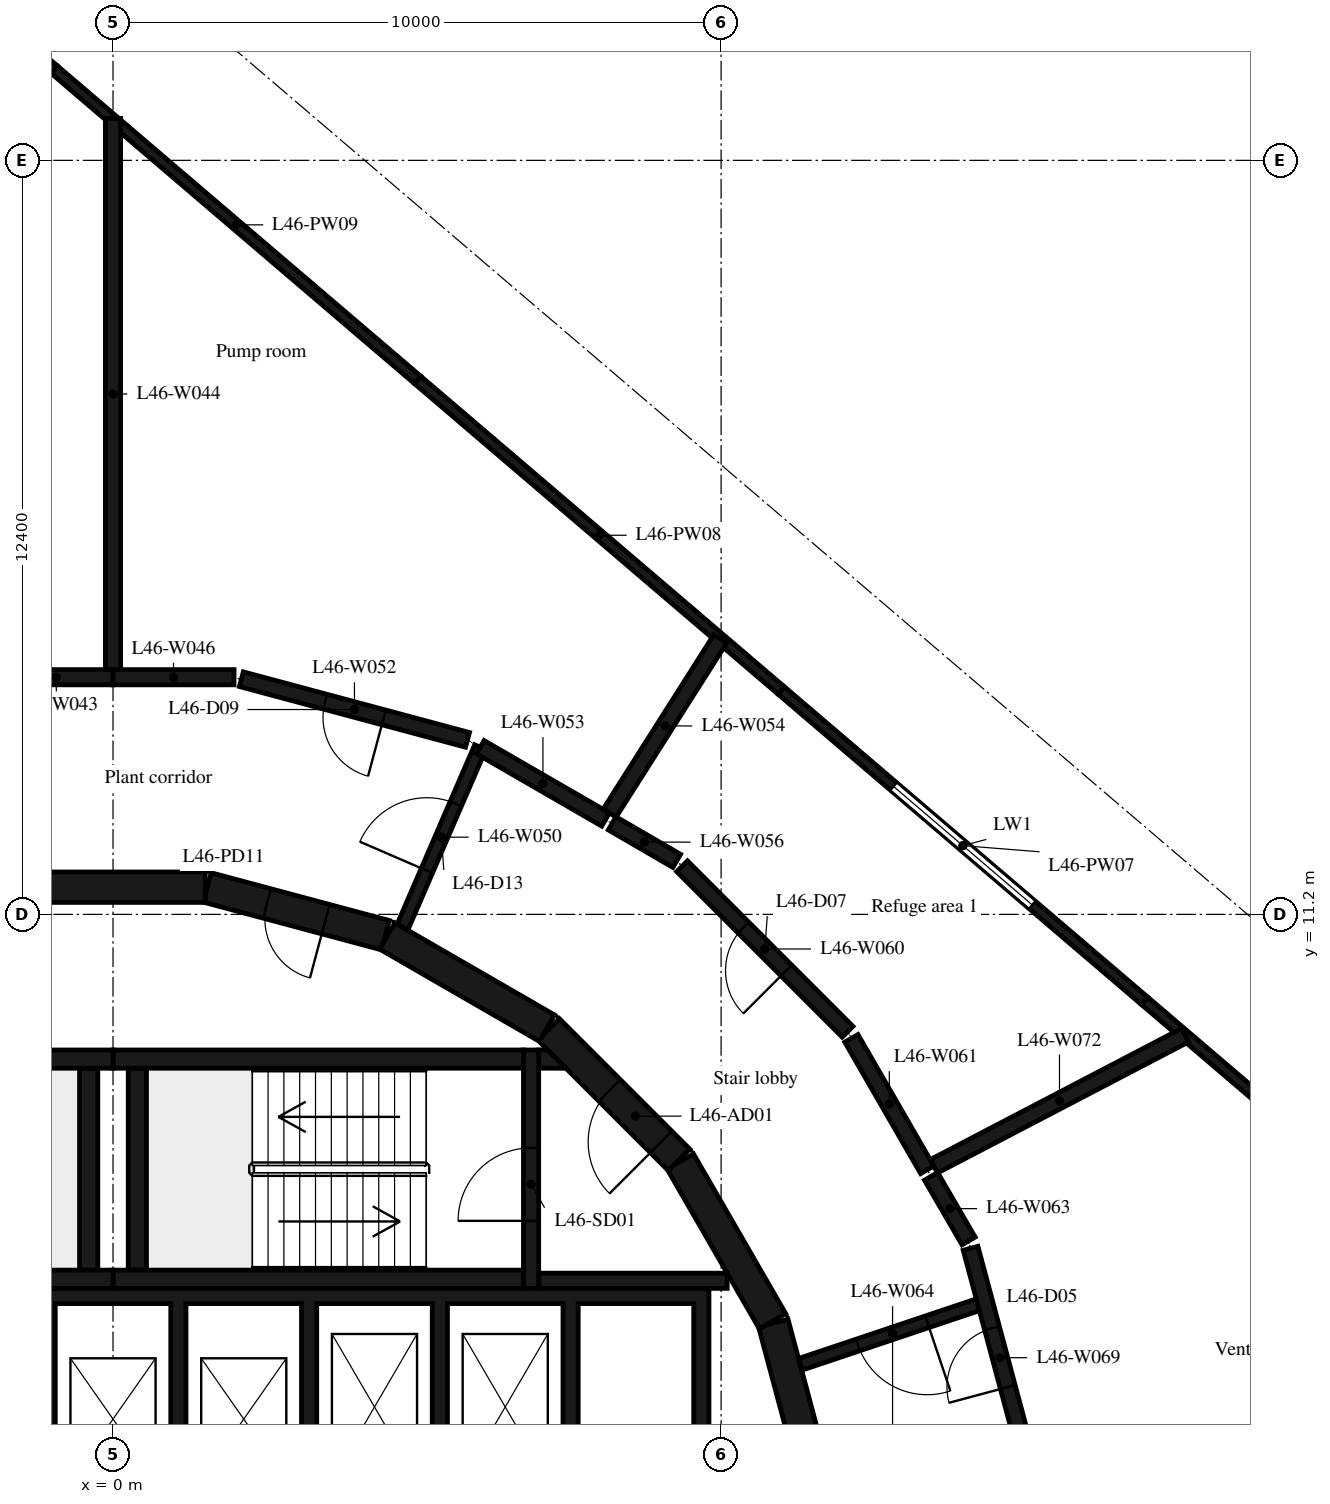
"""IFC4 building model, lengths in metres.
Left out: names, types, materials, properties, quantities, classifications, styles, units other than length and angle.
Written with IfcOpenShell. Run it as: python <this file> out.ifc"""

import sys

from ifc_helpers import new_model, si_unit, direction, frame, frame_2d, origin, place, context, subcontext, project, spatial, polyline, rectangle, outline, extrude, element, fill, save


model = new_model("IFC4")
c1 = context("Model", 3, precision=1e-05, world=origin(), true_north=direction((0.0, 1.0)))
c2 = subcontext(c1, "Body", "Model", "MODEL_VIEW")
j1 = project(units=[si_unit("LENGTHUNIT", "METRE"), si_unit("PLANEANGLEUNIT", "RADIAN")], contexts=[c1])
p1 = place(None, origin())
s1 = spatial("IfcSite", under=j1, at=p1, CompositionType="ELEMENT")
p2 = place(p1, origin())
s2 = spatial("IfcBuilding", under=s1, at=p2, CompositionType="ELEMENT")
p3 = place(p2, frame((0.0, 0.0, 183.2)))
s3 = spatial("IfcBuildingStorey", under=s2, at=p3, CompositionType="ELEMENT", Elevation=183.2)
p4 = place(p3, frame((22.942, 4.673, 0.0), z_axis=(0.0, 0.0, 1.0), x_axis=(-0.76041522011, 0.649437212535, 0.0)))
e1 = element("IfcWall", 1, at=p4, inside=s3, PredefinedType="STANDARD", context=c2, shape_type="SweptSolid", body=[
    extrude(rectangle(XDim=7.86, YDim=0.16, at=frame_2d((3.93, 0.0))), origin(), (0.0, 0.0, 1.0), 4.75),
])
p5 = place(p4, frame((2.167, 0.0, 1.0)))
e2 = element("IfcOpeningElement", 2, at=p5, cuts=e1, PredefinedType="OPENING", context=c2, shape_type="SweptSolid", body=[
    extrude(rectangle(XDim=3.0, YDim=2.2, at=frame_2d((1.5, 1.1))), frame((0.0, 0.09, 0.0), z_axis=(0.0, -1.0, 0.0), x_axis=(1.0, 0.0, 0.0)), (0.0, 0.0, 1.0), 0.18),
])
p6 = place(p3, frame((16.965, 9.778, 0.0), z_axis=(0.0, 0.0, 1.0), x_axis=(-0.760402119436, 0.649452551582, 0.0)))
e3 = element("IfcWall", 3, at=p6, inside=s3, PredefinedType="STANDARD", context=c2, shape_type="SweptSolid", body=[
    extrude(rectangle(XDim=7.86, YDim=0.16, at=frame_2d((3.93, 0.0))), origin(), (0.0, 0.0, 1.0), 4.75),
])
p7 = place(p6, frame((2.43, 0.0, 1.0)))
e4 = element("IfcOpeningElement", 4, at=p7, cuts=e3, PredefinedType="OPENING", context=c2, shape_type="SweptSolid", body=[
    extrude(rectangle(XDim=3.0, YDim=2.2, at=frame_2d((1.5, 1.1))), frame((0.0, 0.09, 0.0), z_axis=(0.0, -1.0, 0.0), x_axis=(1.0, 0.0, 0.0)), (0.0, 0.0, 1.0), 0.18),
])
for number, where, z_axis, x_axis in (
    (5, (10.988, 14.883, 0.0), (0.0, 0.0, 1.0), (-0.76, 0.649, 0.0)),
    (6, (5.011, 19.987, 0.0), (0.0, 0.0, 1.0), (-0.76, 0.649, 0.0)),
):
    element("IfcWall", number, at=place(p3, frame(where, z_axis=z_axis, x_axis=x_axis)), inside=s3, PredefinedType="STANDARD", context=c2, shape_type="SweptSolid", body=[
        extrude(rectangle(XDim=7.86, YDim=0.16, at=frame_2d((3.93, 0.0))), origin(), (0.0, 0.0, 1.0), 4.75),
    ])
p8 = place(p3, frame((-0.966, 25.092, 0.0), z_axis=(0.0, 0.0, 1.0), x_axis=(-0.760346823152, 0.649517288856, 0.0)))
e7 = element("IfcWall", 7, at=p8, inside=s3, PredefinedType="STANDARD", context=c2, shape_type="SweptSolid", body=[
    extrude(rectangle(XDim=1.216, YDim=0.16, at=frame_2d((0.608, 0.0))), origin(), (0.0, 0.0, 1.0), 4.75),
])
for number, where, z_axis, x_axis in (
    (8, (11.643, 1.55, 0.0), (0.0, 0.0, 1.0), (-0.259, 0.966, 0.0)),
    (9, (10.845, 4.51, 0.0), (0.0, 0.0, 1.0), (-0.5, 0.866, 0.0)),
):
    element("IfcWall", number, at=place(p3, frame(where, z_axis=z_axis, x_axis=x_axis)), inside=s3, PredefinedType="SHEAR", context=c2, shape_type="SweptSolid", body=[
        extrude(rectangle(XDim=3.033, YDim=0.5, at=frame_2d((1.516, 0.0))), origin(), (0.0, 0.0, 1.0), 4.75),
    ])
p9 = place(p3, frame((9.308, 7.164, 0.0), z_axis=(0.0, 0.0, 1.0), x_axis=(-0.707106781187, 0.707106781187, 0.0)))
e10 = element("IfcWall", 10, at=p9, inside=s3, PredefinedType="SHEAR", context=c2, shape_type="SweptSolid", body=[
    extrude(rectangle(XDim=3.032, YDim=0.5, at=frame_2d((1.516, 0.0))), origin(), (0.0, 0.0, 1.0), 4.75),
])
p10 = place(p9, frame((0.416, 0.0, 0.0)))
e11 = element("IfcOpeningElement", 11, at=p10, cuts=e10, PredefinedType="OPENING", context=c2, shape_type="SweptSolid", body=[
    extrude(rectangle(XDim=1.2, YDim=2.1, at=frame_2d((0.6, 1.05))), frame((0.0, 0.26, 0.0), z_axis=(0.0, -1.0, 0.0), x_axis=(1.0, 0.0, 0.0)), (0.0, 0.0, 1.0), 0.52),
])
p11 = place(p3, frame((7.137, 9.329, 0.0), z_axis=(0.0, 0.0, 1.0), x_axis=(-0.865975092491, 0.500087131594, 0.0)))
e12 = element("IfcWall", 12, at=p11, inside=s3, PredefinedType="SHEAR", context=c2, shape_type="SweptSolid", body=[
    extrude(rectangle(XDim=3.033, YDim=0.5, at=frame_2d((1.516, 0.0))), origin(), (0.0, 0.0, 1.0), 4.75),
])
p12 = place(p3, frame((4.479, 10.858, 0.0), z_axis=(0.0, 0.0, 1.0), x_axis=(-0.965948410781, 0.258734743916, 0.0)))
e13 = element("IfcWall", 13, at=p12, inside=s3, PredefinedType="SHEAR", context=c2, shape_type="SweptSolid", body=[
    extrude(rectangle(XDim=3.033, YDim=0.5, at=frame_2d((1.516, 0.0))), origin(), (0.0, 0.0, 1.0), 4.75),
])
p13 = place(p12, frame((1.016, 0.0, 0.0)))
e14 = element("IfcOpeningElement", 14, at=p13, cuts=e13, PredefinedType="OPENING", context=c2, shape_type="SweptSolid", body=[
    extrude(rectangle(XDim=1.0, YDim=2.4, at=frame_2d((0.5, 1.2))), frame((0.0, 0.26, 0.0), z_axis=(0.0, -1.0, 0.0), x_axis=(1.0, 0.0, 0.0)), (0.0, 0.0, 1.0), 0.52),
])
p14 = place(p3, frame((1.516, 11.647, 0.0), z_axis=(0.0, 0.0, 1.0), x_axis=(-1.0, 0.0, 0.0)))
e15 = element("IfcWall", 15, at=p14, inside=s3, PredefinedType="SHEAR", context=c2, shape_type="SweptSolid", body=[
    extrude(rectangle(XDim=3.033, YDim=0.5, at=frame_2d((1.516, 0.0))), origin(), (0.0, 0.0, 1.0), 4.75),
])
for number, where, z_axis, x_axis in (
    (16, (0.0, 5.2, 0.0), (0.0, 0.0, 1.0), (1.0, 0.0, 0.0)),
    (17, (0.0, 8.82, 0.0), (0.0, 0.0, 1.0), (1.0, 0.0, 0.0)),
):
    element("IfcWall", number, at=place(p3, frame(where, z_axis=z_axis, x_axis=x_axis)), inside=s3, PredefinedType="SHEAR", context=c2, shape_type="SweptSolid", body=[
        extrude(rectangle(XDim=6.75, YDim=0.3, at=frame_2d((3.375, 0.0))), origin(), (0.0, 0.0, 1.0), 4.75),
    ])
p15 = place(p3, frame((0.4, 5.35, 0.0), z_axis=(0.0, 0.0, 1.0), x_axis=(0.0, 1.0, 0.0)))
e18 = element("IfcWall", 18, at=p15, inside=s3, PredefinedType="SHEAR", context=c2, shape_type="SweptSolid", body=[
    extrude(rectangle(XDim=3.32, YDim=0.3, at=frame_2d((1.66, 0.0))), origin(), (0.0, 0.0, 1.0), 4.75),
])
p16 = place(p3, frame((6.875, 5.05, 0.0), z_axis=(0.0, 0.0, 1.0), x_axis=(0.0, 1.0, 0.0)))
e19 = element("IfcWall", 19, at=p16, inside=s3, PredefinedType="SHEAR", context=c2, shape_type="SweptSolid", body=[
    extrude(rectangle(XDim=3.92, YDim=0.25, at=frame_2d((1.96, 0.0))), origin(), (0.0, 0.0, 1.0), 4.75),
])
p17 = place(p16, frame((1.11, 0.0, 0.0)))
e20 = element("IfcOpeningElement", 20, at=p17, cuts=e19, PredefinedType="OPENING", context=c2, shape_type="SweptSolid", body=[
    extrude(rectangle(XDim=1.2, YDim=2.1, at=frame_2d((0.6, 1.05))), frame((0.0, 0.135, 0.0), z_axis=(0.0, -1.0, 0.0), x_axis=(1.0, 0.0, 0.0)), (0.0, 0.0, 1.0), 0.27),
])
p18 = place(p3, frame((7.0, 5.175, 0.0), z_axis=(0.0, 0.0, 1.0), x_axis=(1.0, 0.0, 0.0)))
e21 = element("IfcWall", 21, at=p18, inside=s3, PredefinedType="SHEAR", context=c2, shape_type="SweptSolid", body=[
    extrude(rectangle(XDim=3.1, YDim=0.25, at=frame_2d((1.55, 0.0))), origin(), (0.0, 0.0, 1.0), 4.75),
])
p19 = place(p3, origin())
e22 = element("IfcWall", 22, at=p19, inside=s3, PredefinedType="SHEAR", context=c2, shape_type="SweptSolid", body=[
    extrude(outline(polyline([(7.448, 8.67), (7.0, 8.67), (7.0, 8.97), (7.148, 8.97), (7.448, 8.67)])), origin(), (0.0, 0.0, 1.0), 4.75),
])
for number, where, z_axis, x_axis in (
    (23, (-6.75, 5.2, 0.0), (0.0, 0.0, 1.0), (1.0, 0.0, 0.0)),
    (24, (-6.75, 8.82, 0.0), (0.0, 0.0, 1.0), (1.0, 0.0, 0.0)),
):
    element("IfcWall", number, at=place(p3, frame(where, z_axis=z_axis, x_axis=x_axis)), inside=s3, PredefinedType="SHEAR", context=c2, shape_type="SweptSolid", body=[
        extrude(rectangle(XDim=6.75, YDim=0.3, at=frame_2d((3.375, 0.0))), origin(), (0.0, 0.0, 1.0), 4.75),
    ])
p20 = place(p3, frame((-0.4, 5.35, 0.0), z_axis=(0.0, 0.0, 1.0), x_axis=(0.0, 1.0, 0.0)))
e25 = element("IfcWall", 25, at=p20, inside=s3, PredefinedType="SHEAR", context=c2, shape_type="SweptSolid", body=[
    extrude(rectangle(XDim=3.32, YDim=0.3, at=frame_2d((1.66, 0.0))), origin(), (0.0, 0.0, 1.0), 4.75),
])
p21 = place(p3, origin())
e26 = element("IfcWall", 26, at=p21, inside=s3, PredefinedType="SHEAR", context=c2, shape_type="SweptSolid", body=[
    extrude(outline(polyline([(-9.55, 4.8), (-5.5, 4.8), (-5.5, 1.9), (-5.25, 1.9), (-5.25, 4.8), (-1.2, 4.8), (-1.2, 1.9), (-0.95, 1.9), (-0.95, 4.8), (0.95, 4.8), (0.95, 1.9), (1.2, 1.9), (1.2, 4.8), (3.1, 4.8), (3.1, 1.9), (3.35, 1.9), (3.35, 4.8), (5.25, 4.8), (5.25, 1.9), (5.5, 1.9), (5.5, 4.8), (7.4, 4.8), (7.4, 1.9), (7.65, 1.9), (7.65, 4.8), (9.55, 4.8), (9.55, 1.9), (9.8, 1.9), (9.8, 4.8), (9.8, 5.05), (-9.8, 5.05), (-9.8, 4.8), (-9.8, 1.9), (-9.55, 1.9), (-9.55, 4.8)])), origin(), (0.0, 0.0, 1.0), 4.75),
])
p22 = place(p3, frame((0.0, 15.1, 0.0), z_axis=(0.0, 0.0, 1.0), x_axis=(-1.0, 0.0, 0.0)))
e27 = element("IfcWall", 27, at=p22, inside=s3, PredefinedType="PARTITIONING", context=c2, shape_type="SweptSolid", body=[
    extrude(rectangle(XDim=1.865, YDim=0.25, at=frame_2d((0.933, 0.0))), origin(), (0.0, 0.0, 1.0), 4.75),
])
p23 = place(p3, frame((0.0, 15.225, 0.0), z_axis=(0.0, 0.0, 1.0), x_axis=(0.0, 1.0, 0.0)))
e28 = element("IfcWall", 28, at=p23, inside=s3, PredefinedType="PARTITIONING", context=c2, shape_type="SweptSolid", body=[
    extrude(rectangle(XDim=9.065, YDim=0.25, at=frame_2d((4.532, 0.0))), origin(), (0.0, 0.0, 1.0), 4.75),
])
p24 = place(p3, frame((1.99, 15.1, 0.0), z_axis=(0.0, 0.0, 1.0), x_axis=(-1.0, 0.0, 0.0)))
e29 = element("IfcWall", 29, at=p24, inside=s3, PredefinedType="PARTITIONING", context=c2, shape_type="SweptSolid", body=[
    extrude(rectangle(XDim=1.99, YDim=0.25, at=frame_2d((0.995, 0.0))), origin(), (0.0, 0.0, 1.0), 4.75),
])
p25 = place(p3, frame((4.76, 10.99, 0.0), z_axis=(0.0, 0.0, 1.0), x_axis=(0.396905977672, 0.917859272922, 0.0)))
e30 = element("IfcWall", 30, at=p25, inside=s3, PredefinedType="PARTITIONING", context=c2, shape_type="SweptSolid", body=[
    extrude(rectangle(XDim=3.224, YDim=0.2, at=frame_2d((1.612, 0.0))), origin(), (0.0, 0.0, 1.0), 4.75),
])
p26 = place(p25, frame((1.012, 0.0, 0.0)))
e31 = element("IfcOpeningElement", 31, at=p26, cuts=e30, PredefinedType="OPENING", context=c2, shape_type="SweptSolid", body=[
    extrude(rectangle(XDim=1.2, YDim=2.1, at=frame_2d((0.6, 1.05))), frame((0.0, 0.11, 0.0), z_axis=(0.0, -1.0, 0.0), x_axis=(1.0, 0.0, 0.0)), (0.0, 0.0, 1.0), 0.22),
])
p27 = place(p3, frame((5.83, 14.07, 0.0), z_axis=(0.0, 0.0, 1.0), x_axis=(-0.965861411942, 0.259059323171, 0.0)))
e32 = element("IfcWall", 32, at=p27, inside=s3, PredefinedType="PARTITIONING", context=c2, shape_type="SweptSolid", body=[
    extrude(rectangle(XDim=3.851, YDim=0.25, at=frame_2d((1.925, 0.0))), origin(), (0.0, 0.0, 1.0), 4.75),
])
p28 = place(p27, frame((1.425, 0.0, 0.0)))
e33 = element("IfcOpeningElement", 33, at=p28, cuts=e32, PredefinedType="OPENING", context=c2, shape_type="SweptSolid", body=[
    extrude(rectangle(XDim=1.0, YDim=2.1, at=frame_2d((0.5, 1.05))), frame((0.0, 0.135, 0.0), z_axis=(0.0, -1.0, 0.0), x_axis=(1.0, 0.0, 0.0)), (0.0, 0.0, 1.0), 0.27),
])
p29 = place(p3, frame((6.04, 13.95, 0.0), z_axis=(0.0, 0.0, 1.0), x_axis=(0.865922362496, -0.500178430292, 0.0)))
e34 = element("IfcWall", 34, at=p29, inside=s3, PredefinedType="PARTITIONING", context=c2, shape_type="SweptSolid", body=[
    extrude(rectangle(XDim=2.379, YDim=0.25, at=frame_2d((1.189, 0.0))), origin(), (0.0, 0.0, 1.0), 4.75),
])
p30 = place(p3, frame((8.167, 12.865, 0.0), z_axis=(0.0, 0.0, 1.0), x_axis=(0.535963404408, 0.844241215018, 0.0)))
e35 = element("IfcWall", 35, at=p30, inside=s3, PredefinedType="PARTITIONING", context=c2, shape_type="SweptSolid", body=[
    extrude(rectangle(XDim=3.396, YDim=0.25, at=frame_2d((1.698, 0.0))), origin(), (0.0, 0.0, 1.0), 4.75),
])
p31 = place(p3, frame((9.27, 12.08, 0.0), z_axis=(0.0, 0.0, 1.0), x_axis=(-0.864599561852, 0.502461538474, 0.0)))
e36 = element("IfcWall", 36, at=p31, inside=s3, PredefinedType="PARTITIONING", context=c2, shape_type="SweptSolid", body=[
    extrude(rectangle(XDim=1.228, YDim=0.25, at=frame_2d((0.614, 0.0))), origin(), (0.0, 0.0, 1.0), 4.75),
])
p32 = place(p3, frame((12.08, 9.27, 0.0), z_axis=(0.0, 0.0, 1.0), x_axis=(-0.707106781187, 0.707106781187, 0.0)))
e37 = element("IfcWall", 37, at=p32, inside=s3, PredefinedType="PARTITIONING", context=c2, shape_type="SweptSolid", body=[
    extrude(rectangle(XDim=3.849, YDim=0.25, at=frame_2d((1.925, 0.0))), origin(), (0.0, 0.0, 1.0), 4.75),
])
p33 = place(p32, frame((1.425, 0.0, 0.0)))
e38 = element("IfcOpeningElement", 38, at=p33, cuts=e37, PredefinedType="OPENING", context=c2, shape_type="SweptSolid", body=[
    extrude(rectangle(XDim=1.0, YDim=2.1, at=frame_2d((0.5, 1.05))), frame((0.0, 0.135, 0.0), z_axis=(0.0, -1.0, 0.0), x_axis=(1.0, 0.0, 0.0)), (0.0, 0.0, 1.0), 0.27),
])
p34 = place(p3, frame((13.39, 7.0, 0.0), z_axis=(0.0, 0.0, 1.0), x_axis=(-0.499790202325, 0.86614649665, 0.0)))
e39 = element("IfcWall", 39, at=p34, inside=s3, PredefinedType="PARTITIONING", context=c2, shape_type="SweptSolid", body=[
    extrude(rectangle(XDim=2.496, YDim=0.25, at=frame_2d((1.248, 0.0))), origin(), (0.0, 0.0, 1.0), 4.75),
])
p35 = place(p3, frame((14.07, 5.83, 0.0), z_axis=(0.0, 0.0, 1.0), x_axis=(-0.502547897079, 0.864549368828, 0.0)))
e40 = element("IfcWall", 40, at=p35, inside=s3, PredefinedType="PARTITIONING", context=c2, shape_type="SweptSolid", body=[
    extrude(rectangle(XDim=1.228, YDim=0.25, at=frame_2d((0.614, 0.0))), origin(), (0.0, 0.0, 1.0), 4.75),
])
p36 = place(p3, frame((14.34, 4.82, 0.0), z_axis=(0.0, 0.0, 1.0), x_axis=(-0.94805712629, -0.318100118345, 0.0)))
e41 = element("IfcWall", 41, at=p36, inside=s3, PredefinedType="PARTITIONING", context=c2, shape_type="SweptSolid", body=[
    extrude(rectangle(XDim=3.207, YDim=0.2, at=frame_2d((1.603, 0.0))), origin(), (0.0, 0.0, 1.0), 4.75),
])
p37 = place(p36, frame((1.003, 0.0, 0.0)))
e42 = element("IfcOpeningElement", 42, at=p37, cuts=e41, PredefinedType="OPENING", context=c2, shape_type="SweptSolid", body=[
    extrude(rectangle(XDim=1.2, YDim=2.1, at=frame_2d((0.6, 1.05))), frame((0.0, 0.11, 0.0), z_axis=(0.0, -1.0, 0.0), x_axis=(1.0, 0.0, 0.0)), (0.0, 0.0, 1.0), 0.22),
])
p38 = place(p3, frame((15.068, 2.111, 0.0), z_axis=(0.0, 0.0, 1.0), x_axis=(-0.259106201401, 0.965848837239, 0.0)))
e43 = element("IfcWall", 43, at=p38, inside=s3, PredefinedType="PARTITIONING", context=c2, shape_type="SweptSolid", body=[
    extrude(rectangle(XDim=3.726, YDim=0.25, at=frame_2d((1.863, 0.0))), origin(), (0.0, 0.0, 1.0), 4.75),
])
p39 = place(p38, frame((1.363, 0.0, 0.0)))
e44 = element("IfcOpeningElement", 44, at=p39, cuts=e43, PredefinedType="OPENING", context=c2, shape_type="SweptSolid", body=[
    extrude(rectangle(XDim=1.0, YDim=2.1, at=frame_2d((0.5, 1.05))), frame((0.0, 0.135, 0.0), z_axis=(0.0, -1.0, 0.0), x_axis=(1.0, 0.0, 0.0)), (0.0, 0.0, 1.0), 0.27),
])
p40 = place(p3, frame((17.629, 9.213, 0.0), z_axis=(0.0, 0.0, 1.0), x_axis=(-0.8864904177, -0.462746949559, 0.0)))
e45 = element("IfcWall", 45, at=p40, inside=s3, PredefinedType="PARTITIONING", context=c2, shape_type="SweptSolid", body=[
    extrude(rectangle(XDim=4.657, YDim=0.25, at=frame_2d((2.329, 0.0))), origin(), (0.0, 0.0, 1.0), 4.75),
])
p41 = place(p7, origin())
e46 = element("IfcWindow", 46, at=p41, inside=s3, PartitioningType="SINGLE_PANEL", PredefinedType="WINDOW", context=c2, shape_type="SweptSolid", body=[
    extrude(rectangle(XDim=3.0, YDim=2.2, at=frame_2d((1.5, 1.1))), frame((0.0, 0.03, 0.0), z_axis=(0.0, -1.0, 0.0), x_axis=(1.0, 0.0, 0.0)), (0.0, 0.0, 1.0), 0.06),
])
fill(e4, e46)
p42 = place(p17, origin())
e47 = element("IfcDoor", 47, at=p42, inside=s3, OperationType="SINGLE_SWING_LEFT", PredefinedType="DOOR", context=c2, shape_type="SweptSolid", body=[
    extrude(rectangle(XDim=1.2, YDim=2.1, at=frame_2d((0.6, 1.05))), frame((0.0, 0.025, 0.0), z_axis=(0.0, -1.0, 0.0), x_axis=(1.0, 0.0, 0.0)), (0.0, 0.0, 1.0), 0.05),
])
fill(e20, e47)
p43 = place(p10, origin())
e48 = element("IfcDoor", 48, at=p43, inside=s3, OperationType="SINGLE_SWING_RIGHT", PredefinedType="DOOR", context=c2, shape_type="SweptSolid", body=[
    extrude(rectangle(XDim=1.2, YDim=2.1, at=frame_2d((0.6, 1.05))), frame((0.0, 0.025, 0.0), z_axis=(0.0, -1.0, 0.0), x_axis=(1.0, 0.0, 0.0)), (0.0, 0.0, 1.0), 0.05),
])
fill(e11, e48)
p44 = place(p13, origin())
e49 = element("IfcDoor", 49, at=p44, inside=s3, OperationType="SINGLE_SWING_LEFT", PredefinedType="DOOR", context=c2, shape_type="SweptSolid", body=[
    extrude(rectangle(XDim=1.0, YDim=2.4, at=frame_2d((0.5, 1.2))), frame((0.0, 0.025, 0.0), z_axis=(0.0, -1.0, 0.0), x_axis=(1.0, 0.0, 0.0)), (0.0, 0.0, 1.0), 0.05),
])
fill(e14, e49)
p45 = place(p39, origin())
e50 = element("IfcDoor", 50, at=p45, inside=s3, OperationType="SINGLE_SWING_LEFT", PredefinedType="DOOR", context=c2, shape_type="SweptSolid", body=[
    extrude(rectangle(XDim=1.0, YDim=2.1, at=frame_2d((0.5, 1.05))), frame((0.0, 0.025, 0.0), z_axis=(0.0, -1.0, 0.0), x_axis=(1.0, 0.0, 0.0)), (0.0, 0.0, 1.0), 0.05),
])
fill(e44, e50)
p46 = place(p33, origin())
e51 = element("IfcDoor", 51, at=p46, inside=s3, OperationType="SINGLE_SWING_LEFT", PredefinedType="DOOR", context=c2, shape_type="SweptSolid", body=[
    extrude(rectangle(XDim=1.0, YDim=2.1, at=frame_2d((0.5, 1.05))), frame((0.0, 0.025, 0.0), z_axis=(0.0, -1.0, 0.0), x_axis=(1.0, 0.0, 0.0)), (0.0, 0.0, 1.0), 0.05),
])
fill(e38, e51)
p47 = place(p28, origin())
e52 = element("IfcDoor", 52, at=p47, inside=s3, OperationType="SINGLE_SWING_LEFT", PredefinedType="DOOR", context=c2, shape_type="SweptSolid", body=[
    extrude(rectangle(XDim=1.0, YDim=2.1, at=frame_2d((0.5, 1.05))), frame((0.0, 0.025, 0.0), z_axis=(0.0, -1.0, 0.0), x_axis=(1.0, 0.0, 0.0)), (0.0, 0.0, 1.0), 0.05),
])
fill(e33, e52)
p48 = place(p26, origin())
e53 = element("IfcDoor", 53, at=p48, inside=s3, OperationType="SINGLE_SWING_LEFT", PredefinedType="DOOR", context=c2, shape_type="SweptSolid", body=[
    extrude(rectangle(XDim=1.2, YDim=2.1, at=frame_2d((0.6, 1.05))), frame((0.0, 0.025, 0.0), z_axis=(0.0, -1.0, 0.0), x_axis=(1.0, 0.0, 0.0)), (0.0, 0.0, 1.0), 0.05),
])
fill(e31, e53)
p49 = place(p37, origin())
e54 = element("IfcDoor", 54, at=p49, inside=s3, OperationType="SINGLE_SWING_LEFT", PredefinedType="DOOR", context=c2, shape_type="SweptSolid", body=[
    extrude(rectangle(XDim=1.2, YDim=2.1, at=frame_2d((0.6, 1.05))), frame((0.0, 0.025, 0.0), z_axis=(0.0, -1.0, 0.0), x_axis=(1.0, 0.0, 0.0)), (0.0, 0.0, 1.0), 0.05),
])
fill(e42, e54)
save(model, sys.argv[1])
